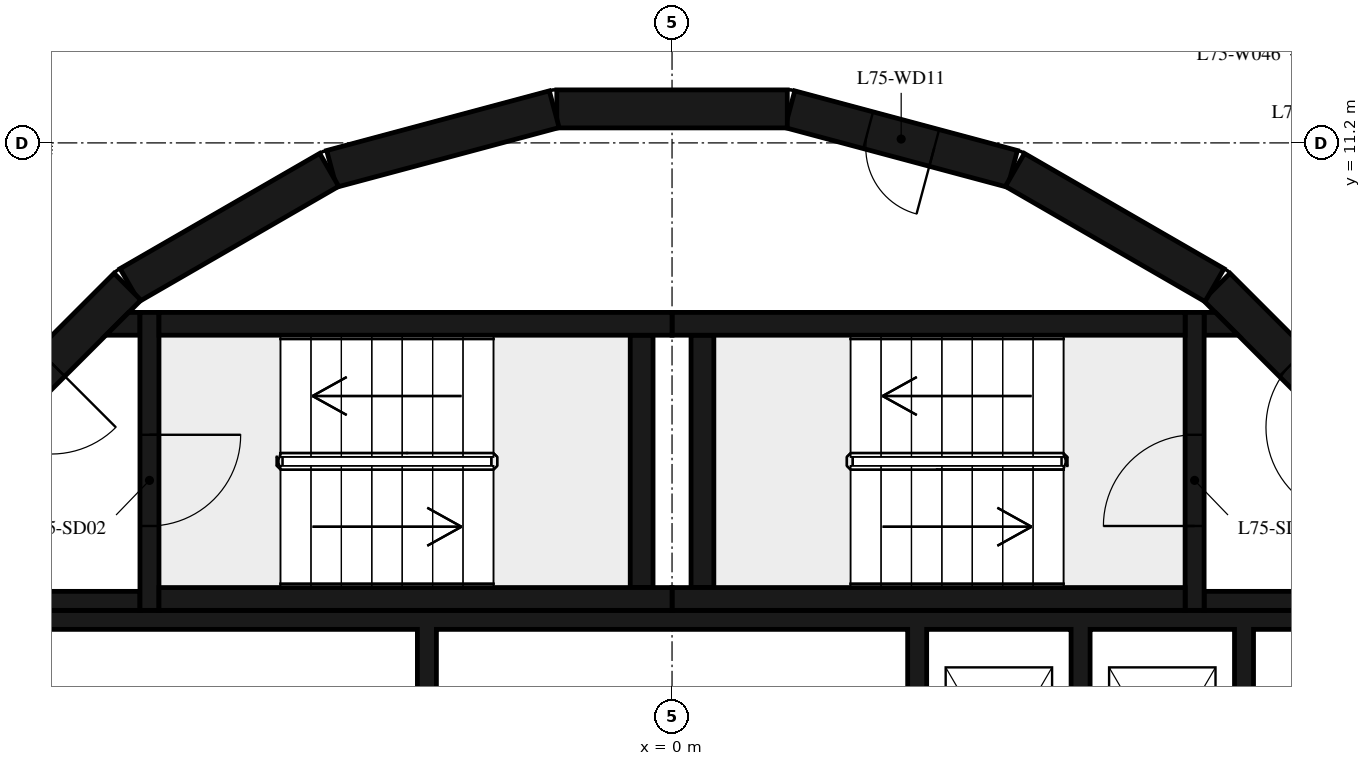
"""IFC4 building model, lengths in metres.
Left out: names, types, materials, properties, quantities, classifications, styles, units other than length and angle.
Written with IfcOpenShell. Run it as: python <this file> out.ifc"""

import sys

from ifc_helpers import new_model, si_unit, direction, frame, frame_2d, origin, place, context, subcontext, project, spatial, polyline, rectangle, outline, extrude, element, fill, save


model = new_model("IFC4")
c1 = context("Model", 3, precision=1e-05, world=origin(), true_north=direction((0.0, 1.0)))
c2 = subcontext(c1, "Body", "Model", "MODEL_VIEW")
j1 = project(units=[si_unit("LENGTHUNIT", "METRE"), si_unit("PLANEANGLEUNIT", "RADIAN")], contexts=[c1])
p1 = place(None, origin())
s1 = spatial("IfcSite", under=j1, at=p1, CompositionType="ELEMENT")
p2 = place(p1, origin())
s2 = spatial("IfcBuilding", under=s1, at=p2, CompositionType="ELEMENT")
p3 = place(p2, frame((0.0, 0.0, 291.4)))
s3 = spatial("IfcBuildingStorey", under=s2, at=p3, CompositionType="ELEMENT", Elevation=291.4)
p4 = place(p3, frame((9.308, 7.164, 0.0), z_axis=(0.0, 0.0, 1.0), x_axis=(-0.707106781187, 0.707106781187, 0.0)))
e1 = element("IfcWall", 1, at=p4, inside=s3, PredefinedType="SHEAR", context=c2, shape_type="SweptSolid", body=[
    extrude(rectangle(XDim=3.032, YDim=0.5, at=frame_2d((1.516, 0.0))), origin(), (0.0, 0.0, 1.0), 6.35),
])
p5 = place(p4, frame((0.416, 0.0, 0.0)))
e2 = element("IfcOpeningElement", 2, at=p5, cuts=e1, PredefinedType="OPENING", context=c2, shape_type="SweptSolid", body=[
    extrude(rectangle(XDim=1.2, YDim=2.1, at=frame_2d((0.6, 1.05))), frame((0.0, 0.26, 0.0), z_axis=(0.0, -1.0, 0.0), x_axis=(1.0, 0.0, 0.0)), (0.0, 0.0, 1.0), 0.52),
])
p6 = place(p3, frame((7.137, 9.329, 0.0), z_axis=(0.0, 0.0, 1.0), x_axis=(-0.865975092491, 0.500087131594, 0.0)))
e3 = element("IfcWall", 3, at=p6, inside=s3, PredefinedType="SHEAR", context=c2, shape_type="SweptSolid", body=[
    extrude(rectangle(XDim=3.033, YDim=0.5, at=frame_2d((1.516, 0.0))), origin(), (0.0, 0.0, 1.0), 6.35),
])
p7 = place(p3, frame((4.479, 10.858, 0.0), z_axis=(0.0, 0.0, 1.0), x_axis=(-0.965948410781, 0.258734743916, 0.0)))
e4 = element("IfcWall", 4, at=p7, inside=s3, PredefinedType="SHEAR", context=c2, shape_type="SweptSolid", body=[
    extrude(rectangle(XDim=3.033, YDim=0.5, at=frame_2d((1.516, 0.0))), origin(), (0.0, 0.0, 1.0), 6.35),
])
p8 = place(p7, frame((1.066, 0.0, 0.0)))
e5 = element("IfcOpeningElement", 5, at=p8, cuts=e4, PredefinedType="OPENING", context=c2, shape_type="SweptSolid", body=[
    extrude(rectangle(XDim=0.9, YDim=2.1, at=frame_2d((0.45, 1.05))), frame((0.0, 0.26, 0.0), z_axis=(0.0, -1.0, 0.0), x_axis=(1.0, 0.0, 0.0)), (0.0, 0.0, 1.0), 0.52),
])
for number, where, z_axis, x_axis in (
    (6, (1.516, 11.647, 0.0), (0.0, 0.0, 1.0), (-1.0, 0.0, 0.0)),
    (7, (-1.55, 11.643, 0.0), (0.0, 0.0, 1.0), (-0.966, -0.259, 0.0)),
    (8, (-4.51, 10.845, 0.0), (0.0, 0.0, 1.0), (-0.866, -0.5, 0.0)),
):
    element("IfcWall", number, at=place(p3, frame(where, z_axis=z_axis, x_axis=x_axis)), inside=s3, PredefinedType="SHEAR", context=c2, shape_type="SweptSolid", body=[
        extrude(rectangle(XDim=3.033, YDim=0.5, at=frame_2d((1.516, 0.0))), origin(), (0.0, 0.0, 1.0), 6.35),
    ])
p9 = place(p3, frame((-7.164, 9.308, 0.0), z_axis=(0.0, 0.0, 1.0), x_axis=(-0.707106781187, -0.707106781187, 0.0)))
e9 = element("IfcWall", 9, at=p9, inside=s3, PredefinedType="SHEAR", context=c2, shape_type="SweptSolid", body=[
    extrude(rectangle(XDim=3.032, YDim=0.5, at=frame_2d((1.516, 0.0))), origin(), (0.0, 0.0, 1.0), 6.35),
])
p10 = place(p9, frame((1.416, 0.0, 0.0)))
e10 = element("IfcOpeningElement", 10, at=p10, cuts=e9, PredefinedType="OPENING", context=c2, shape_type="SweptSolid", body=[
    extrude(rectangle(XDim=1.2, YDim=2.1, at=frame_2d((0.6, 1.05))), frame((0.0, 0.26, 0.0), z_axis=(0.0, -1.0, 0.0), x_axis=(1.0, 0.0, 0.0)), (0.0, 0.0, 1.0), 0.52),
])
for number, where, z_axis, x_axis in (
    (11, (0.0, 5.2, 0.0), (0.0, 0.0, 1.0), (1.0, 0.0, 0.0)),
    (12, (0.0, 8.82, 0.0), (0.0, 0.0, 1.0), (1.0, 0.0, 0.0)),
):
    element("IfcWall", number, at=place(p3, frame(where, z_axis=z_axis, x_axis=x_axis)), inside=s3, PredefinedType="SHEAR", context=c2, shape_type="SweptSolid", body=[
        extrude(rectangle(XDim=6.75, YDim=0.3, at=frame_2d((3.375, 0.0))), origin(), (0.0, 0.0, 1.0), 6.35),
    ])
p11 = place(p3, frame((0.4, 5.35, 0.0), z_axis=(0.0, 0.0, 1.0), x_axis=(0.0, 1.0, 0.0)))
e13 = element("IfcWall", 13, at=p11, inside=s3, PredefinedType="SHEAR", context=c2, shape_type="SweptSolid", body=[
    extrude(rectangle(XDim=3.32, YDim=0.3, at=frame_2d((1.66, 0.0))), origin(), (0.0, 0.0, 1.0), 6.35),
])
p12 = place(p3, frame((6.875, 5.05, 0.0), z_axis=(0.0, 0.0, 1.0), x_axis=(0.0, 1.0, 0.0)))
e14 = element("IfcWall", 14, at=p12, inside=s3, PredefinedType="SHEAR", context=c2, shape_type="SweptSolid", body=[
    extrude(rectangle(XDim=3.92, YDim=0.25, at=frame_2d((1.96, 0.0))), origin(), (0.0, 0.0, 1.0), 6.35),
])
p13 = place(p12, frame((1.11, 0.0, 0.0)))
e15 = element("IfcOpeningElement", 15, at=p13, cuts=e14, PredefinedType="OPENING", context=c2, shape_type="SweptSolid", body=[
    extrude(rectangle(XDim=1.2, YDim=2.1, at=frame_2d((0.6, 1.05))), frame((0.0, 0.135, 0.0), z_axis=(0.0, -1.0, 0.0), x_axis=(1.0, 0.0, 0.0)), (0.0, 0.0, 1.0), 0.27),
])
p14 = place(p3, frame((7.0, 5.175, 0.0), z_axis=(0.0, 0.0, 1.0), x_axis=(1.0, 0.0, 0.0)))
e16 = element("IfcWall", 16, at=p14, inside=s3, PredefinedType="SHEAR", context=c2, shape_type="SweptSolid", body=[
    extrude(rectangle(XDim=3.1, YDim=0.25, at=frame_2d((1.55, 0.0))), origin(), (0.0, 0.0, 1.0), 6.35),
])
p15 = place(p3, origin())
e17 = element("IfcWall", 17, at=p15, inside=s3, PredefinedType="SHEAR", context=c2, shape_type="SweptSolid", body=[
    extrude(outline(polyline([(7.448, 8.67), (7.0, 8.67), (7.0, 8.97), (7.148, 8.97), (7.448, 8.67)])), origin(), (0.0, 0.0, 1.0), 6.35),
])
for number, where, z_axis, x_axis in (
    (18, (-6.75, 5.2, 0.0), (0.0, 0.0, 1.0), (1.0, 0.0, 0.0)),
    (19, (-6.75, 8.82, 0.0), (0.0, 0.0, 1.0), (1.0, 0.0, 0.0)),
):
    element("IfcWall", number, at=place(p3, frame(where, z_axis=z_axis, x_axis=x_axis)), inside=s3, PredefinedType="SHEAR", context=c2, shape_type="SweptSolid", body=[
        extrude(rectangle(XDim=6.75, YDim=0.3, at=frame_2d((3.375, 0.0))), origin(), (0.0, 0.0, 1.0), 6.35),
    ])
p16 = place(p3, frame((-0.4, 5.35, 0.0), z_axis=(0.0, 0.0, 1.0), x_axis=(0.0, 1.0, 0.0)))
e20 = element("IfcWall", 20, at=p16, inside=s3, PredefinedType="SHEAR", context=c2, shape_type="SweptSolid", body=[
    extrude(rectangle(XDim=3.32, YDim=0.3, at=frame_2d((1.66, 0.0))), origin(), (0.0, 0.0, 1.0), 6.35),
])
p17 = place(p3, frame((-6.875, 8.97, 0.0), z_axis=(0.0, 0.0, 1.0), x_axis=(0.0, -1.0, 0.0)))
e21 = element("IfcWall", 21, at=p17, inside=s3, PredefinedType="SHEAR", context=c2, shape_type="SweptSolid", body=[
    extrude(rectangle(XDim=3.92, YDim=0.25, at=frame_2d((1.96, 0.0))), origin(), (0.0, 0.0, 1.0), 6.35),
])
p18 = place(p17, frame((1.61, 0.0, 0.0)))
e22 = element("IfcOpeningElement", 22, at=p18, cuts=e21, PredefinedType="OPENING", context=c2, shape_type="SweptSolid", body=[
    extrude(rectangle(XDim=1.2, YDim=2.1, at=frame_2d((0.6, 1.05))), frame((0.0, 0.135, 0.0), z_axis=(0.0, -1.0, 0.0), x_axis=(1.0, 0.0, 0.0)), (0.0, 0.0, 1.0), 0.27),
])
p19 = place(p3, frame((-7.0, 5.175, 0.0), z_axis=(0.0, 0.0, 1.0), x_axis=(-1.0, 0.0, 0.0)))
e23 = element("IfcWall", 23, at=p19, inside=s3, PredefinedType="SHEAR", context=c2, shape_type="SweptSolid", body=[
    extrude(rectangle(XDim=3.1, YDim=0.25, at=frame_2d((1.55, 0.0))), origin(), (0.0, 0.0, 1.0), 6.35),
])
p20 = place(p3, origin())
e24 = element("IfcWall", 24, at=p20, inside=s3, PredefinedType="SHEAR", context=c2, shape_type="SweptSolid", body=[
    extrude(outline(polyline([(-7.148, 8.97), (-7.0, 8.97), (-7.0, 8.67), (-7.448, 8.67), (-7.148, 8.97)])), origin(), (0.0, 0.0, 1.0), 6.35),
])
p21 = place(p3, origin())
e25 = element("IfcWall", 25, at=p21, inside=s3, PredefinedType="SHEAR", context=c2, shape_type="SweptSolid", body=[
    extrude(outline(polyline([(-9.8, 1.9), (-9.55, 1.9), (-9.55, 4.8), (-3.35, 4.8), (-3.35, 1.9), (-3.1, 1.9), (-3.1, 4.8), (3.1, 4.8), (3.1, 1.9), (3.35, 1.9), (3.35, 4.8), (5.25, 4.8), (5.25, 1.9), (5.5, 1.9), (5.5, 4.8), (7.4, 4.8), (7.4, 1.9), (7.65, 1.9), (7.65, 4.8), (9.55, 4.8), (9.55, 1.9), (9.8, 1.9), (9.8, 4.8), (9.8, 5.05), (-9.8, 5.05), (-9.8, 4.8), (-9.8, 1.9)])), origin(), (0.0, 0.0, 1.0), 6.35),
])
p22 = place(p13, origin())
e26 = element("IfcDoor", 26, at=p22, inside=s3, OperationType="SINGLE_SWING_LEFT", PredefinedType="DOOR", context=c2, shape_type="SweptSolid", body=[
    extrude(rectangle(XDim=1.2, YDim=2.1, at=frame_2d((0.6, 1.05))), frame((0.0, 0.025, 0.0), z_axis=(0.0, -1.0, 0.0), x_axis=(1.0, 0.0, 0.0)), (0.0, 0.0, 1.0), 0.05),
])
fill(e15, e26)
p23 = place(p5, origin())
e27 = element("IfcDoor", 27, at=p23, inside=s3, OperationType="SINGLE_SWING_RIGHT", PredefinedType="DOOR", context=c2, shape_type="SweptSolid", body=[
    extrude(rectangle(XDim=1.2, YDim=2.1, at=frame_2d((0.6, 1.05))), frame((0.0, 0.025, 0.0), z_axis=(0.0, -1.0, 0.0), x_axis=(1.0, 0.0, 0.0)), (0.0, 0.0, 1.0), 0.05),
])
fill(e2, e27)
p24 = place(p18, origin())
e28 = element("IfcDoor", 28, at=p24, inside=s3, OperationType="SINGLE_SWING_LEFT", PredefinedType="DOOR", context=c2, shape_type="SweptSolid", body=[
    extrude(rectangle(XDim=1.2, YDim=2.1, at=frame_2d((0.6, 1.05))), frame((0.0, 0.025, 0.0), z_axis=(0.0, -1.0, 0.0), x_axis=(1.0, 0.0, 0.0)), (0.0, 0.0, 1.0), 0.05),
])
fill(e22, e28)
p25 = place(p10, origin())
e29 = element("IfcDoor", 29, at=p25, inside=s3, OperationType="SINGLE_SWING_RIGHT", PredefinedType="DOOR", context=c2, shape_type="SweptSolid", body=[
    extrude(rectangle(XDim=1.2, YDim=2.1, at=frame_2d((0.6, 1.05))), frame((0.0, 0.025, 0.0), z_axis=(0.0, -1.0, 0.0), x_axis=(1.0, 0.0, 0.0)), (0.0, 0.0, 1.0), 0.05),
])
fill(e10, e29)
p26 = place(p8, origin())
e30 = element("IfcDoor", 30, at=p26, inside=s3, OperationType="SINGLE_SWING_LEFT", PredefinedType="DOOR", context=c2, shape_type="SweptSolid", body=[
    extrude(rectangle(XDim=0.9, YDim=2.1, at=frame_2d((0.45, 1.05))), frame((0.0, 0.025, 0.0), z_axis=(0.0, -1.0, 0.0), x_axis=(1.0, 0.0, 0.0)), (0.0, 0.0, 1.0), 0.05),
])
fill(e5, e30)
save(model, sys.argv[1])
